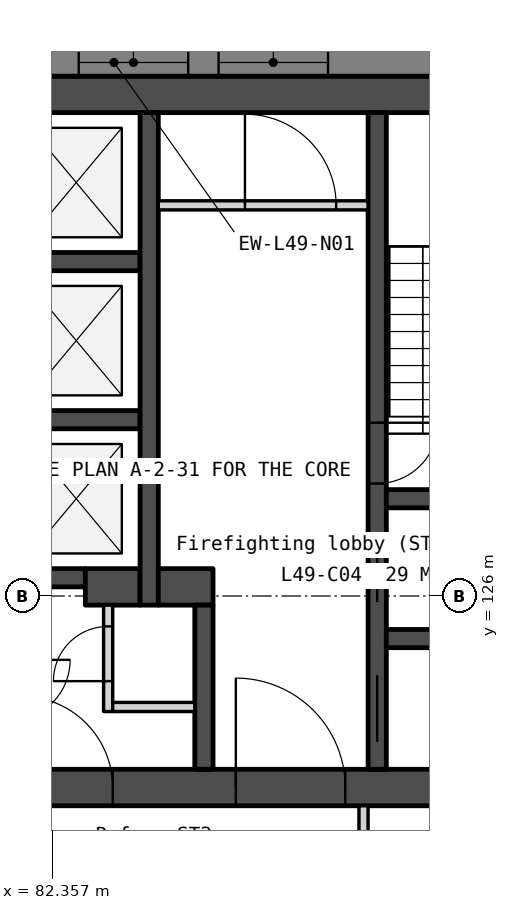
"""IFC4 building model, lengths in metres.
Left out: names, types, materials, properties, quantities, classifications, styles, units other than length and angle.
Written with IfcOpenShell. Run it as: python <this file> out.ifc"""

import sys

from ifc_helpers import new_model, si_unit, direction, frame, frame_2d, origin, place, context, subcontext, project, spatial, polyline, rectangle, outline, extrude, element, fill, save


model = new_model("IFC4")
c1 = context("Model", 3, precision=1e-05, world=origin(), true_north=direction((0.0, 1.0)))
c2 = subcontext(c1, "Body", "Model", "MODEL_VIEW")
j1 = project(units=[si_unit("LENGTHUNIT", "METRE"), si_unit("PLANEANGLEUNIT", "RADIAN")], contexts=[c1])
p1 = place(None, origin())
s1 = spatial("IfcSite", under=j1, at=p1, CompositionType="ELEMENT")
p2 = place(p1, origin())
s2 = spatial("IfcBuilding", under=s1, at=p2, CompositionType="ELEMENT")
p3 = place(p2, frame((0.0, 0.0, 195.8)))
s3 = spatial("IfcBuildingStorey", under=s2, at=p3, CompositionType="ELEMENT", Elevation=195.8)
p4 = place(p3, frame((69.0, 134.25, 0.0), z_axis=(0.0, 0.0, 1.0), x_axis=(1.0, 0.0, 0.0)))
e1 = element("IfcWall", 1, at=p4, inside=s3, PredefinedType="SOLIDWALL", context=c2, shape_type="SweptSolid", body=[
    extrude(rectangle(XDim=22.0, YDim=0.6, at=frame_2d((11.0, 0.0))), origin(), (0.0, 0.0, 1.0), 3.75),
])
p5 = place(p3, frame((69.0, 122.85, 0.0), z_axis=(0.0, 0.0, 1.0), x_axis=(1.0, 0.0, 0.0)))
e2 = element("IfcWall", 2, at=p5, inside=s3, PredefinedType="SOLIDWALL", context=c2, shape_type="SweptSolid", body=[
    extrude(rectangle(XDim=22.0, YDim=0.6, at=frame_2d((11.0, 0.0))), origin(), (0.0, 0.0, 1.0), 3.75),
])
p6 = place(p5, frame((16.375, 0.0, 0.0)))
e3 = element("IfcOpeningElement", 3, at=p6, cuts=e2, PredefinedType="OPENING", context=c2, shape_type="SweptSolid", body=[
    extrude(rectangle(XDim=1.8, YDim=2.1, at=frame_2d((0.9, 1.05))), frame((0.0, 0.31, 0.0), z_axis=(0.0, -1.0, 0.0), x_axis=(1.0, 0.0, 0.0)), (0.0, 0.0, 1.0), 0.62),
])
p7 = place(p5, frame((3.825, 0.0, 0.0)))
e4 = element("IfcOpeningElement", 4, at=p7, cuts=e2, PredefinedType="OPENING", context=c2, shape_type="SweptSolid", body=[
    extrude(rectangle(XDim=1.8, YDim=2.1, at=frame_2d((0.9, 1.05))), frame((0.0, 0.31, 0.0), z_axis=(0.0, -1.0, 0.0), x_axis=(1.0, 0.0, 0.0)), (0.0, 0.0, 1.0), 0.62),
])
p8 = place(p5, frame((12.85, 0.0, 0.0)))
e5 = element("IfcOpeningElement", 5, at=p8, cuts=e2, PredefinedType="OPENING", context=c2, shape_type="SweptSolid", body=[
    extrude(rectangle(XDim=1.5, YDim=2.1, at=frame_2d((0.75, 1.05))), frame((0.0, 0.31, 0.0), z_axis=(0.0, -1.0, 0.0), x_axis=(1.0, 0.0, 0.0)), (0.0, 0.0, 1.0), 0.62),
])
for number, where, z_axis, x_axis in (
    (6, (81.7, 131.5, 0.0), (0.0, 0.0, 1.0), (1.0, 0.0, 0.0)),
    (7, (81.7, 128.9, 0.0), (0.0, 0.0, 1.0), (1.0, 0.0, 0.0)),
):
    element("IfcWall", number, at=place(p3, frame(where, z_axis=z_axis, x_axis=x_axis)), inside=s3, PredefinedType="SOLIDWALL", context=c2, shape_type="SweptSolid", body=[
        extrude(rectangle(XDim=2.1, YDim=0.3, at=frame_2d((1.05, 0.0))), origin(), (0.0, 0.0, 1.0), 3.75),
    ])
p9 = place(p3, frame((81.7, 126.3, 0.0), z_axis=(0.0, 0.0, 1.0), x_axis=(1.0, 0.0, 0.0)))
e8 = element("IfcWall", 8, at=p9, inside=s3, PredefinedType="SOLIDWALL", context=c2, shape_type="SweptSolid", body=[
    extrude(rectangle(XDim=1.2, YDim=0.3, at=frame_2d((0.6, 0.0))), origin(), (0.0, 0.0, 1.0), 3.75),
])
p10 = place(p3, frame((82.9, 126.15, 0.0), z_axis=(0.0, 0.0, 1.0), x_axis=(1.0, 0.0, 0.0)))
e9 = element("IfcWall", 9, at=p10, inside=s3, PredefinedType="SOLIDWALL", context=c2, shape_type="SweptSolid", body=[
    extrude(rectangle(XDim=0.9, YDim=0.6, at=frame_2d((0.45, 0.0))), origin(), (0.0, 0.0, 1.0), 3.75),
])
p11 = place(p3, frame((83.275, 125.85, 0.0), z_axis=(0.0, 0.0, 1.0), x_axis=(0.0, -1.0, 0.0)))
e10 = element("IfcWall", 10, at=p11, inside=s3, PredefinedType="PARTITIONING", context=c2, shape_type="SweptSolid", body=[
    extrude(rectangle(XDim=1.75, YDim=0.15, at=frame_2d((0.875, 0.0))), origin(), (0.0, 0.0, 1.0), 3.75),
])
p12 = place(p11, frame((0.35, 0.0, 0.0)))
e11 = element("IfcOpeningElement", 11, at=p12, cuts=e10, PredefinedType="OPENING", context=c2, shape_type="SweptSolid", body=[
    extrude(rectangle(XDim=0.9, YDim=2.1, at=frame_2d((0.45, 1.05))), frame((0.0, 0.085, 0.0), z_axis=(0.0, -1.0, 0.0), x_axis=(1.0, 0.0, 0.0)), (0.0, 0.0, 1.0), 0.17),
])
p13 = place(p3, frame((83.35, 124.175, 0.0), z_axis=(0.0, 0.0, 1.0), x_axis=(1.0, 0.0, 0.0)))
e12 = element("IfcWall", 12, at=p13, inside=s3, PredefinedType="PARTITIONING", context=c2, shape_type="SweptSolid", body=[
    extrude(rectangle(XDim=1.35, YDim=0.15, at=frame_2d((0.675, 0.0))), origin(), (0.0, 0.0, 1.0), 3.75),
])
p14 = place(p3, frame((83.95, 133.95, 0.0), z_axis=(0.0, 0.0, 1.0), x_axis=(0.0, -1.0, 0.0)))
e13 = element("IfcWall", 13, at=p14, inside=s3, PredefinedType="SOLIDWALL", context=c2, shape_type="SweptSolid", body=[
    extrude(rectangle(XDim=8.1, YDim=0.3, at=frame_2d((4.05, 0.0))), origin(), (0.0, 0.0, 1.0), 3.75),
])
p15 = place(p3, frame((84.1, 132.425, 0.0), z_axis=(0.0, 0.0, 1.0), x_axis=(1.0, 0.0, 0.0)))
e14 = element("IfcWall", 14, at=p15, inside=s3, PredefinedType="PARTITIONING", context=c2, shape_type="SweptSolid", body=[
    extrude(rectangle(XDim=3.45, YDim=0.15, at=frame_2d((1.725, 0.0))), origin(), (0.0, 0.0, 1.0), 3.75),
])
p16 = place(p15, frame((1.425, 0.0, 0.0)))
e15 = element("IfcOpeningElement", 15, at=p16, cuts=e14, PredefinedType="OPENING", context=c2, shape_type="SweptSolid", body=[
    extrude(rectangle(XDim=1.5, YDim=2.1, at=frame_2d((0.75, 1.05))), frame((0.0, 0.085, 0.0), z_axis=(0.0, -1.0, 0.0), x_axis=(1.0, 0.0, 0.0)), (0.0, 0.0, 1.0), 0.17),
])
p17 = place(p3, frame((84.1, 126.15, 0.0), z_axis=(0.0, 0.0, 1.0), x_axis=(1.0, 0.0, 0.0)))
e16 = element("IfcWall", 16, at=p17, inside=s3, PredefinedType="SOLIDWALL", context=c2, shape_type="SweptSolid", body=[
    extrude(rectangle(XDim=0.9, YDim=0.6, at=frame_2d((0.45, 0.0))), origin(), (0.0, 0.0, 1.0), 3.75),
])
p18 = place(p3, frame((84.85, 125.85, 0.0), z_axis=(0.0, 0.0, 1.0), x_axis=(0.0, -1.0, 0.0)))
e17 = element("IfcWall", 17, at=p18, inside=s3, PredefinedType="SOLIDWALL", context=c2, shape_type="SweptSolid", body=[
    extrude(rectangle(XDim=2.7, YDim=0.3, at=frame_2d((1.35, 0.0))), origin(), (0.0, 0.0, 1.0), 3.75),
])
p19 = place(p3, frame((87.7, 133.95, 0.0), z_axis=(0.0, 0.0, 1.0), x_axis=(0.0, -1.0, 0.0)))
e18 = element("IfcWall", 18, at=p19, inside=s3, PredefinedType="SOLIDWALL", context=c2, shape_type="SweptSolid", body=[
    extrude(rectangle(XDim=10.8, YDim=0.3, at=frame_2d((5.4, 0.0))), origin(), (0.0, 0.0, 1.0), 3.75),
])
p20 = place(p19, frame((6.95, 0.0, 0.0)))
e19 = element("IfcOpeningElement", 19, at=p20, cuts=e18, PredefinedType="OPENING", context=c2, shape_type="SweptSolid", body=[
    extrude(rectangle(XDim=1.1, YDim=2.1, at=frame_2d((0.55, 1.05))), frame((0.0, 0.16, 0.0), z_axis=(0.0, -1.0, 0.0), x_axis=(1.0, 0.0, 0.0)), (0.0, 0.0, 1.0), 0.32),
])
p21 = place(p19, frame((5.1, 0.0, 0.0)))
e20 = element("IfcOpeningElement", 20, at=p21, cuts=e18, PredefinedType="OPENING", context=c2, shape_type="SweptSolid", body=[
    extrude(rectangle(XDim=1.0, YDim=2.1, at=frame_2d((0.5, 1.05))), frame((0.0, 0.16, 0.0), z_axis=(0.0, -1.0, 0.0), x_axis=(1.0, 0.0, 0.0)), (0.0, 0.0, 1.0), 0.32),
])
p22 = place(p19, frame((9.25, 0.0, 0.0)))
e21 = element("IfcOpeningElement", 21, at=p22, cuts=e18, PredefinedType="OPENING", context=c2, shape_type="SweptSolid", body=[
    extrude(rectangle(XDim=1.1, YDim=2.1, at=frame_2d((0.55, 1.05))), frame((0.0, 0.16, 0.0), z_axis=(0.0, -1.0, 0.0), x_axis=(1.0, 0.0, 0.0)), (0.0, 0.0, 1.0), 0.32),
])
for number, where, z_axis, x_axis in (
    (22, (87.85, 127.6, 0.0), (0.0, 0.0, 1.0), (1.0, 0.0, 0.0)),
    (23, (87.85, 125.3, 0.0), (0.0, 0.0, 1.0), (1.0, 0.0, 0.0)),
):
    element("IfcWall", number, at=place(p3, frame(where, z_axis=z_axis, x_axis=x_axis)), inside=s3, PredefinedType="SOLIDWALL", context=c2, shape_type="SweptSolid", body=[
        extrude(rectangle(XDim=2.55, YDim=0.3, at=frame_2d((1.275, 0.0))), origin(), (0.0, 0.0, 1.0), 3.75),
    ])
p23 = place(p3, frame((99.365, 134.775, -0.15), z_axis=(0.0, 0.0, 1.0), x_axis=(-1.0, 0.0, 0.0)))
e24 = element("IfcWall", 24, at=p23, inside=s3, PredefinedType="SOLIDWALL", context=c2, shape_type="SweptSolid", body=[
    extrude(outline(polyline([(0.0, 0.0), (0.0, 3.9), (31.988, 3.9), (31.988, 0.0), (0.0, 0.0)])), frame((0.0, 0.225, 0.0), z_axis=(0.0, -1.0, 0.0), x_axis=(1.0, 0.0, 0.0)), (0.0, 0.0, 1.0), 0.45),
])
p24 = place(p23, frame((2.791, 0.0, 0.95)))
e25 = element("IfcOpeningElement", 25, at=p24, cuts=e24, PredefinedType="OPENING", context=c2, shape_type="SweptSolid", body=[
    extrude(rectangle(XDim=1.8, YDim=2.2, at=frame_2d((0.9, 1.1))), frame((0.0, 0.235, 0.0), z_axis=(0.0, -1.0, 0.0), x_axis=(1.0, 0.0, 0.0)), (0.0, 0.0, 1.0), 0.47),
])
p25 = place(p23, frame((5.091, 0.0, 0.95)))
e26 = element("IfcOpeningElement", 26, at=p25, cuts=e24, PredefinedType="OPENING", context=c2, shape_type="SweptSolid", body=[
    extrude(rectangle(XDim=1.8, YDim=2.2, at=frame_2d((0.9, 1.1))), frame((0.0, 0.235, 0.0), z_axis=(0.0, -1.0, 0.0), x_axis=(1.0, 0.0, 0.0)), (0.0, 0.0, 1.0), 0.47),
])
p26 = place(p23, frame((12.473, 0.0, 0.95)))
e27 = element("IfcOpeningElement", 27, at=p26, cuts=e24, PredefinedType="OPENING", context=c2, shape_type="SweptSolid", body=[
    extrude(rectangle(XDim=1.8, YDim=2.2, at=frame_2d((0.9, 1.1))), frame((0.0, 0.235, 0.0), z_axis=(0.0, -1.0, 0.0), x_axis=(1.0, 0.0, 0.0)), (0.0, 0.0, 1.0), 0.47),
])
p27 = place(p23, frame((14.773, 0.0, 0.95)))
e28 = element("IfcOpeningElement", 28, at=p27, cuts=e24, PredefinedType="OPENING", context=c2, shape_type="SweptSolid", body=[
    extrude(rectangle(XDim=1.8, YDim=2.2, at=frame_2d((0.9, 1.1))), frame((0.0, 0.235, 0.0), z_axis=(0.0, -1.0, 0.0), x_axis=(1.0, 0.0, 0.0)), (0.0, 0.0, 1.0), 0.47),
])
p28 = place(p23, frame((22.156, 0.0, 0.95)))
e29 = element("IfcOpeningElement", 29, at=p28, cuts=e24, PredefinedType="OPENING", context=c2, shape_type="SweptSolid", body=[
    extrude(rectangle(XDim=1.8, YDim=2.2, at=frame_2d((0.9, 1.1))), frame((0.0, 0.235, 0.0), z_axis=(0.0, -1.0, 0.0), x_axis=(1.0, 0.0, 0.0)), (0.0, 0.0, 1.0), 0.47),
])
p29 = place(p23, frame((24.456, 0.0, 0.95)))
e30 = element("IfcOpeningElement", 30, at=p29, cuts=e24, PredefinedType="OPENING", context=c2, shape_type="SweptSolid", body=[
    extrude(rectangle(XDim=1.8, YDim=2.2, at=frame_2d((0.9, 1.1))), frame((0.0, 0.235, 0.0), z_axis=(0.0, -1.0, 0.0), x_axis=(1.0, 0.0, 0.0)), (0.0, 0.0, 1.0), 0.47),
])
p30 = place(p3, frame((81.505, 98.627, -0.15), z_axis=(0.0, 0.0, 1.0), x_axis=(0.500002199942, 0.866024133644, 0.0)))
e31 = element("IfcWall", 31, at=p30, inside=s3, PredefinedType="SOLIDWALL", context=c2, shape_type="SweptSolid", body=[
    extrude(outline(polyline([(38.729, 0.0), (38.729, 3.9), (0.0, 3.9), (0.0, 0.0), (38.729, 0.0)])), frame((0.0, 0.225, 0.0), z_axis=(0.0, -1.0, 0.0), x_axis=(1.0, 0.0, 0.0)), (0.0, 0.0, 1.0), 0.45),
])
p31 = place(p30, frame((2.791, 0.0, 0.95)))
e32 = element("IfcOpeningElement", 32, at=p31, cuts=e31, PredefinedType="OPENING", context=c2, shape_type="SweptSolid", body=[
    extrude(rectangle(XDim=1.8, YDim=2.2, at=frame_2d((0.9, 1.1))), frame((0.0, 0.235, 0.0), z_axis=(0.0, -1.0, 0.0), x_axis=(1.0, 0.0, 0.0)), (0.0, 0.0, 1.0), 0.47),
])
p32 = place(p30, frame((5.091, 0.0, 0.95)))
e33 = element("IfcOpeningElement", 33, at=p32, cuts=e31, PredefinedType="OPENING", context=c2, shape_type="SweptSolid", body=[
    extrude(rectangle(XDim=1.8, YDim=2.2, at=frame_2d((0.9, 1.1))), frame((0.0, 0.235, 0.0), z_axis=(0.0, -1.0, 0.0), x_axis=(1.0, 0.0, 0.0)), (0.0, 0.0, 1.0), 0.47),
])
p33 = place(p30, frame((12.473, 0.0, 0.95)))
e34 = element("IfcOpeningElement", 34, at=p33, cuts=e31, PredefinedType="OPENING", context=c2, shape_type="SweptSolid", body=[
    extrude(rectangle(XDim=1.8, YDim=2.2, at=frame_2d((0.9, 1.1))), frame((0.0, 0.235, 0.0), z_axis=(0.0, -1.0, 0.0), x_axis=(1.0, 0.0, 0.0)), (0.0, 0.0, 1.0), 0.47),
])
p34 = place(p30, frame((14.773, 0.0, 0.95)))
e35 = element("IfcOpeningElement", 35, at=p34, cuts=e31, PredefinedType="OPENING", context=c2, shape_type="SweptSolid", body=[
    extrude(rectangle(XDim=1.8, YDim=2.2, at=frame_2d((0.9, 1.1))), frame((0.0, 0.235, 0.0), z_axis=(0.0, -1.0, 0.0), x_axis=(1.0, 0.0, 0.0)), (0.0, 0.0, 1.0), 0.47),
])
p35 = place(p30, frame((22.156, 0.0, 0.95)))
e36 = element("IfcOpeningElement", 36, at=p35, cuts=e31, PredefinedType="OPENING", context=c2, shape_type="SweptSolid", body=[
    extrude(rectangle(XDim=1.8, YDim=2.2, at=frame_2d((0.9, 1.1))), frame((0.0, 0.235, 0.0), z_axis=(0.0, -1.0, 0.0), x_axis=(1.0, 0.0, 0.0)), (0.0, 0.0, 1.0), 0.47),
])
p36 = place(p30, frame((24.456, 0.0, 0.95)))
e37 = element("IfcOpeningElement", 37, at=p36, cuts=e31, PredefinedType="OPENING", context=c2, shape_type="SweptSolid", body=[
    extrude(rectangle(XDim=1.8, YDim=2.2, at=frame_2d((0.9, 1.1))), frame((0.0, 0.235, 0.0), z_axis=(0.0, -1.0, 0.0), x_axis=(1.0, 0.0, 0.0)), (0.0, 0.0, 1.0), 0.47),
])
p37 = place(p30, frame((31.838, 0.0, 0.95)))
e38 = element("IfcOpeningElement", 38, at=p37, cuts=e31, PredefinedType="OPENING", context=c2, shape_type="SweptSolid", body=[
    extrude(rectangle(XDim=1.8, YDim=2.2, at=frame_2d((0.9, 1.1))), frame((0.0, 0.235, 0.0), z_axis=(0.0, -1.0, 0.0), x_axis=(1.0, 0.0, 0.0)), (0.0, 0.0, 1.0), 0.47),
])
p38 = place(p30, frame((34.138, 0.0, 0.95)))
e39 = element("IfcOpeningElement", 39, at=p38, cuts=e31, PredefinedType="OPENING", context=c2, shape_type="SweptSolid", body=[
    extrude(rectangle(XDim=1.8, YDim=2.2, at=frame_2d((0.9, 1.1))), frame((0.0, 0.235, 0.0), z_axis=(0.0, -1.0, 0.0), x_axis=(1.0, 0.0, 0.0)), (0.0, 0.0, 1.0), 0.47),
])
p39 = place(p3, frame((87.475, 120.025, 0.0), z_axis=(0.0, 0.0, 1.0), x_axis=(0.0, 1.0, 0.0)))
e40 = element("IfcWall", 40, at=p39, inside=s3, PredefinedType="PARTITIONING", context=c2, shape_type="SweptSolid", body=[
    extrude(rectangle(XDim=2.525, YDim=0.15, at=frame_2d((1.263, 0.0))), origin(), (0.0, 0.0, 1.0), 3.75),
])
p40 = place(p20, origin())
e41 = element("IfcDoor", 41, at=p40, inside=s3, OperationType="SLIDING_TO_LEFT", PredefinedType="DOOR", context=c2, shape_type="SweptSolid", body=[
    extrude(rectangle(XDim=1.1, YDim=2.1, at=frame_2d((0.55, 1.05))), frame((0.0, 0.025, 0.0), z_axis=(0.0, -1.0, 0.0), x_axis=(1.0, 0.0, 0.0)), (0.0, 0.0, 1.0), 0.05),
])
fill(e19, e41)
p41 = place(p6, origin())
e42 = element("IfcDoor", 42, at=p41, inside=s3, OperationType="DOUBLE_DOOR_DOUBLE_SWING", PredefinedType="DOOR", context=c2, shape_type="SweptSolid", body=[
    extrude(rectangle(XDim=1.8, YDim=2.1, at=frame_2d((0.9, 1.05))), frame((0.0, 0.025, 0.0), z_axis=(0.0, -1.0, 0.0), x_axis=(1.0, 0.0, 0.0)), (0.0, 0.0, 1.0), 0.05),
])
fill(e3, e42)
p42 = place(p8, origin())
e43 = element("IfcDoor", 43, at=p42, inside=s3, OperationType="DOUBLE_DOOR_DOUBLE_SWING", PredefinedType="DOOR", context=c2, shape_type="SweptSolid", body=[
    extrude(rectangle(XDim=1.5, YDim=2.1, at=frame_2d((0.75, 1.05))), frame((0.0, 0.025, 0.0), z_axis=(0.0, -1.0, 0.0), x_axis=(1.0, 0.0, 0.0)), (0.0, 0.0, 1.0), 0.05),
])
fill(e5, e43)
p43 = place(p12, origin())
e44 = element("IfcDoor", 44, at=p43, inside=s3, OperationType="SINGLE_SWING_RIGHT", PredefinedType="DOOR", context=c2, shape_type="SweptSolid", body=[
    extrude(rectangle(XDim=0.9, YDim=2.1, at=frame_2d((0.45, 1.05))), frame((0.0, 0.025, 0.0), z_axis=(0.0, -1.0, 0.0), x_axis=(1.0, 0.0, 0.0)), (0.0, 0.0, 1.0), 0.05),
])
fill(e11, e44)
p44 = place(p16, origin())
e45 = element("IfcDoor", 45, at=p44, inside=s3, OperationType="DOUBLE_DOOR_DOUBLE_SWING", PredefinedType="DOOR", context=c2, shape_type="SweptSolid", body=[
    extrude(rectangle(XDim=1.5, YDim=2.1, at=frame_2d((0.75, 1.05))), frame((0.0, 0.025, 0.0), z_axis=(0.0, -1.0, 0.0), x_axis=(1.0, 0.0, 0.0)), (0.0, 0.0, 1.0), 0.05),
])
fill(e15, e45)
p45 = place(p21, origin())
e46 = element("IfcDoor", 46, at=p45, inside=s3, OperationType="SINGLE_SWING_LEFT", PredefinedType="DOOR", context=c2, shape_type="SweptSolid", body=[
    extrude(rectangle(XDim=1.0, YDim=2.1, at=frame_2d((0.5, 1.05))), frame((0.0, 0.025, 0.0), z_axis=(0.0, -1.0, 0.0), x_axis=(1.0, 0.0, 0.0)), (0.0, 0.0, 1.0), 0.05),
])
fill(e20, e46)
p46 = place(p22, origin())
e47 = element("IfcDoor", 47, at=p46, inside=s3, OperationType="SLIDING_TO_LEFT", PredefinedType="DOOR", context=c2, shape_type="SweptSolid", body=[
    extrude(rectangle(XDim=1.1, YDim=2.1, at=frame_2d((0.55, 1.05))), frame((0.0, 0.025, 0.0), z_axis=(0.0, -1.0, 0.0), x_axis=(1.0, 0.0, 0.0)), (0.0, 0.0, 1.0), 0.05),
])
fill(e21, e47)
p47 = place(p26, origin())
e48 = element("IfcWindow", 48, at=p47, inside=s3, PartitioningType="SINGLE_PANEL", PredefinedType="WINDOW", context=c2, shape_type="SweptSolid", body=[
    extrude(rectangle(XDim=1.8, YDim=2.2, at=frame_2d((0.9, 1.1))), frame((0.0, 0.03, 0.0), z_axis=(0.0, -1.0, 0.0), x_axis=(1.0, 0.0, 0.0)), (0.0, 0.0, 1.0), 0.06),
])
fill(e27, e48)
p48 = place(p27, origin())
e49 = element("IfcWindow", 49, at=p48, inside=s3, PartitioningType="SINGLE_PANEL", PredefinedType="WINDOW", context=c2, shape_type="SweptSolid", body=[
    extrude(rectangle(XDim=1.8, YDim=2.2, at=frame_2d((0.9, 1.1))), frame((0.0, 0.03, 0.0), z_axis=(0.0, -1.0, 0.0), x_axis=(1.0, 0.0, 0.0)), (0.0, 0.0, 1.0), 0.06),
])
fill(e28, e49)
save(model, sys.argv[1])
